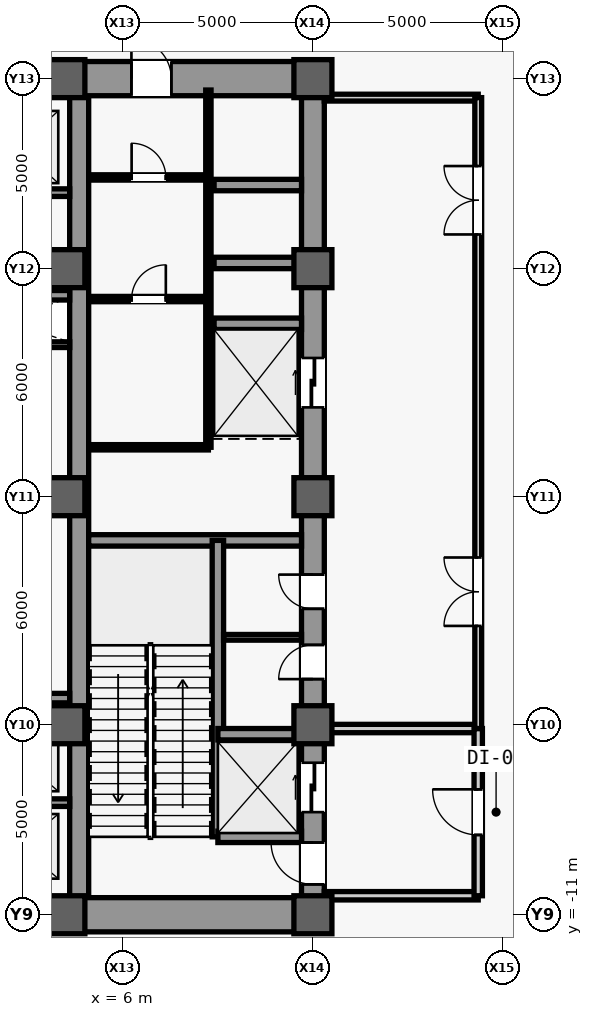
"""IFC4 building model, lengths in metres.
Left out: names, types, materials, properties, quantities, classifications, styles, units other than length and angle.
Written with IfcOpenShell. Run it as: python <this file> out.ifc"""

import sys

from ifc_helpers import new_model, si_unit, direction, frame, frame_2d, origin, origin_2d, place, context, subcontext, project, spatial, rectangle, extrude, source, transform, mapped, element, fill, save


model = new_model("IFC4")
c1 = context("Model", 3, precision=1e-05, world=origin(), true_north=direction((0.0, 1.0)))
c2 = subcontext(c1, "Body", "Model", "MODEL_VIEW")
j1 = project(units=[si_unit("LENGTHUNIT", "METRE"), si_unit("PLANEANGLEUNIT", "RADIAN")], contexts=[c1])
p1 = place(None, origin())
s1 = spatial("IfcSite", under=j1, at=p1, CompositionType="ELEMENT")
p2 = place(p1, origin())
s2 = spatial("IfcBuilding", under=s1, at=p2, CompositionType="ELEMENT")
p3 = place(p2, origin())
s3 = spatial("IfcBuildingStorey", under=s2, at=p3, CompositionType="ELEMENT", Elevation=0.0)
m1 = source(origin(), c2, "Body", "SweptSolid", [
    extrude(rectangle(XDim=22.0, YDim=0.6, at=frame_2d((11.0, 0.0))), origin(), (0.0, 0.0, 1.0), 6.28),
])
p4 = place(p3, frame((11.0, -11.0, 0.0), z_axis=(0.0, 0.0, 1.0), x_axis=(0.0, 1.0, 0.0)))
e1 = element("IfcWall", 1, at=p4, inside=s3, PredefinedType="SHEAR", context=c2, shape_type="MappedRepresentation", body=[
    mapped(m1, transform((0.0, 0.0, 0.0), scale=1.0)),
])
m2 = source(origin(), c2, "Body", "SweptSolid", [
    extrude(rectangle(XDim=1.1, YDim=2.2, at=frame_2d((0.55, 1.1))), frame((0.0, 0.31, 0.0), z_axis=(0.0, -1.0, 0.0), x_axis=(1.0, 0.0, 0.0)), (0.0, 0.0, 1.0), 0.62),
])
p5 = place(p4, frame((0.8, 0.0, 0.0)))
e2 = element("IfcOpeningElement", 2, at=p5, cuts=e1, PredefinedType="OPENING", context=c2, shape_type="MappedRepresentation", body=[
    mapped(m2, transform((0.0, 0.0, 0.0), scale=1.0)),
])
m3 = source(origin(), c2, "Body", "SweptSolid", [
    extrude(rectangle(XDim=0.9, YDim=2.15, at=frame_2d((0.45, 1.075))), frame((0.0, 0.31, 0.0), z_axis=(0.0, -1.0, 0.0), x_axis=(1.0, 0.0, 0.0)), (0.0, 0.0, 1.0), 0.62),
])
p6 = place(p4, frame((6.2, 0.0, 0.0)))
e3 = element("IfcOpeningElement", 3, at=p6, cuts=e1, PredefinedType="OPENING", context=c2, shape_type="MappedRepresentation", body=[
    mapped(m3, transform((0.0, 0.0, 0.0), scale=1.0)),
])
p7 = place(p4, frame((8.05, 0.0, 0.0)))
e4 = element("IfcOpeningElement", 4, at=p7, cuts=e1, PredefinedType="OPENING", context=c2, shape_type="MappedRepresentation", body=[
    mapped(m3, transform((0.0, 0.0, 0.0), scale=1.0)),
])
m4 = source(origin(), c2, "Body", "SweptSolid", [
    extrude(rectangle(XDim=1.3, YDim=2.3, at=frame_2d((0.65, 1.15))), frame((0.0, 0.31, 0.0), z_axis=(0.0, -1.0, 0.0), x_axis=(1.0, 0.0, 0.0)), (0.0, 0.0, 1.0), 0.62),
])
p8 = place(p4, frame((2.7, 0.0, 0.0)))
e5 = element("IfcOpeningElement", 5, at=p8, cuts=e1, PredefinedType="OPENING", context=c2, shape_type="MappedRepresentation", body=[
    mapped(m4, transform((0.0, 0.0, 0.0), scale=1.0)),
])
p9 = place(p4, frame((13.35, 0.0, 0.0)))
e6 = element("IfcOpeningElement", 6, at=p9, cuts=e1, PredefinedType="OPENING", context=c2, shape_type="MappedRepresentation", body=[
    mapped(m4, transform((0.0, 0.0, 0.0), scale=1.0)),
])
m5 = source(origin(), c2, "Body", "SweptSolid", [
    extrude(rectangle(XDim=21.4, YDim=0.5, at=frame_2d((10.7, 0.0))), origin(), (0.0, 0.0, 1.0), 6.28),
])
p10 = place(p3, frame((4.85, -10.7, 0.0), z_axis=(0.0, 0.0, 1.0), x_axis=(0.0, 1.0, 0.0)))
e7 = element("IfcWall", 7, at=p10, inside=s3, PredefinedType="SHEAR", context=c2, shape_type="MappedRepresentation", body=[
    mapped(m5, transform((0.0, 0.0, 0.0), scale=1.0)),
])
m6 = source(origin(), c2, "Body", "SweptSolid", [
    extrude(rectangle(XDim=5.85, YDim=0.9, at=frame_2d((2.925, 0.0))), origin(), (0.0, 0.0, 1.0), 6.28),
])
p11 = place(p3, frame((4.85, -11.0, 0.0), z_axis=(0.0, 0.0, 1.0), x_axis=(1.0, 0.0, 0.0)))
e8 = element("IfcWall", 8, at=p11, inside=s3, PredefinedType="SHEAR", context=c2, shape_type="MappedRepresentation", body=[
    mapped(m6, transform((0.0, 0.0, 0.0), scale=1.0)),
])
p12 = place(p3, frame((4.85, 11.0, 0.0), z_axis=(0.0, 0.0, 1.0), x_axis=(1.0, 0.0, 0.0)))
e9 = element("IfcWall", 9, at=p12, inside=s3, PredefinedType="SHEAR", context=c2, shape_type="MappedRepresentation", body=[
    mapped(m6, transform((0.0, 0.0, 0.0), scale=1.0)),
])
m7 = source(origin(), c2, "Body", "SweptSolid", [
    extrude(rectangle(XDim=1.05, YDim=2.2, at=frame_2d((0.525, 1.1))), frame((0.0, 0.46, 0.0), z_axis=(0.0, -1.0, 0.0), x_axis=(1.0, 0.0, 0.0)), (0.0, 0.0, 1.0), 0.92),
])
p13 = place(p12, frame((1.375, 0.0, 0.0)))
e10 = element("IfcOpeningElement", 10, at=p13, cuts=e9, PredefinedType="OPENING", context=c2, shape_type="MappedRepresentation", body=[
    mapped(m7, transform((0.0, 0.0, 0.0), scale=1.0)),
])
m8 = source(origin(), c2, "Body", "SweptSolid", [
    extrude(rectangle(XDim=5.6, YDim=0.3, at=frame_2d((2.8, 0.0))), origin(), (0.0, 0.0, 1.0), 6.28),
])
p14 = place(p3, frame((5.1, -1.15, 0.0), z_axis=(0.0, 0.0, 1.0), x_axis=(1.0, 0.0, 0.0)))
e11 = element("IfcWall", 11, at=p14, inside=s3, PredefinedType="SHEAR", context=c2, shape_type="MappedRepresentation", body=[
    mapped(m8, transform((0.0, 0.0, 0.0), scale=1.0)),
])
m9 = source(origin(), c2, "Body", "SweptSolid", [
    extrude(rectangle(XDim=9.2, YDim=0.5, at=frame_2d((4.6, 0.0))), origin(), (0.0, 0.0, 1.0), 6.28),
])
p15 = place(p3, frame((-4.6, -11.0, 0.0), z_axis=(0.0, 0.0, 1.0), x_axis=(1.0, 0.0, 0.0)))
e12 = element("IfcWall", 12, at=p15, inside=s3, PredefinedType="SHEAR", context=c2, shape_type="MappedRepresentation", body=[
    mapped(m9, transform((0.0, 0.0, 0.0), scale=1.0)),
])
m10 = source(origin(), c2, "Body", "SweptSolid", [
    extrude(rectangle(XDim=1.8, YDim=2.25, at=frame_2d((0.9, 1.125))), frame((0.0, 0.26, 0.0), z_axis=(0.0, -1.0, 0.0), x_axis=(1.0, 0.0, 0.0)), (0.0, 0.0, 1.0), 0.52),
])
p16 = place(p15, frame((3.7, 0.0, 0.0)))
e13 = element("IfcOpeningElement", 13, at=p16, cuts=e12, PredefinedType="OPENING", context=c2, shape_type="MappedRepresentation", body=[
    mapped(m10, transform((0.0, 0.0, 0.0), scale=1.0)),
])
p17 = place(p3, frame((-4.6, 11.0, 0.0), z_axis=(0.0, 0.0, 1.0), x_axis=(1.0, 0.0, 0.0)))
e14 = element("IfcWall", 14, at=p17, inside=s3, PredefinedType="SHEAR", context=c2, shape_type="MappedRepresentation", body=[
    mapped(m9, transform((0.0, 0.0, 0.0), scale=1.0)),
])
p18 = place(p17, frame((3.7, 0.0, 0.0)))
e15 = element("IfcOpeningElement", 15, at=p18, cuts=e14, PredefinedType="OPENING", context=c2, shape_type="MappedRepresentation", body=[
    mapped(m10, transform((0.0, 0.0, 0.0), scale=1.0)),
])
m11 = source(origin(), c2, "Body", "SweptSolid", [
    extrude(rectangle(XDim=1.0, YDim=1.0, at=origin_2d()), origin(), (0.0, 0.0, 1.0), 6.6),
])
for number, where, z_axis, x_axis in (
    (16, (4.5, -11.0, 0.0), (0.0, 0.0, 1.0), (1.0, 0.0, 0.0)),
    (17, (4.5, -6.0, 0.0), (0.0, 0.0, 1.0), (1.0, 0.0, 0.0)),
    (18, (4.5, 0.0, 0.0), (0.0, 0.0, 1.0), (1.0, 0.0, 0.0)),
    (19, (4.5, 6.0, 0.0), (0.0, 0.0, 1.0), (1.0, 0.0, 0.0)),
    (20, (4.5, 11.0, 0.0), (0.0, 0.0, 1.0), (1.0, 0.0, 0.0)),
    (21, (11.0, -11.0, 0.0), (0.0, 0.0, 1.0), (1.0, 0.0, 0.0)),
    (22, (11.0, -6.0, 0.0), (0.0, 0.0, 1.0), (1.0, 0.0, 0.0)),
    (23, (11.0, 0.0, 0.0), (0.0, 0.0, 1.0), (1.0, 0.0, 0.0)),
    (24, (11.0, 6.0, 0.0), (0.0, 0.0, 1.0), (1.0, 0.0, 0.0)),
    (25, (11.0, 11.0, 0.0), (0.0, 0.0, 1.0), (1.0, 0.0, 0.0)),
):
    element("IfcColumn", number, at=place(p3, frame(where, z_axis=z_axis, x_axis=x_axis)), inside=s3, PredefinedType="COLUMN", context=c2, shape_type="MappedRepresentation", body=[
        mapped(m11, transform((0.0, 0.0, 0.0), scale=1.0)),
    ])
m12 = source(origin(), c2, "Body", "SweptSolid", [
    extrude(rectangle(XDim=7.8, YDim=0.3, at=frame_2d((3.9, 0.0))), origin(), (0.0, 0.0, 1.0), 6.28),
])
p19 = place(p3, frame((8.5, -8.95, 0.0), z_axis=(0.0, 0.0, 1.0), x_axis=(0.0, 1.0, 0.0)))
e26 = element("IfcWall", 26, at=p19, inside=s3, PredefinedType="SHEAR", context=c2, shape_type="MappedRepresentation", body=[
    mapped(m12, transform((0.0, 0.0, 0.0), scale=1.0)),
])
m13 = source(origin(), c2, "Body", "SweptSolid", [
    extrude(rectangle(XDim=2.2, YDim=0.3, at=frame_2d((1.1, 0.0))), origin(), (0.0, 0.0, 1.0), 6.28),
])
for number, where, z_axis, x_axis in (
    (27, (8.5, -8.95, 0.0), (0.0, 0.0, 1.0), (1.0, 0.0, 0.0)),
    (28, (8.5, -6.25, 0.0), (0.0, 0.0, 1.0), (1.0, 0.0, 0.0)),
):
    element("IfcWall", number, at=place(p3, frame(where, z_axis=z_axis, x_axis=x_axis)), inside=s3, PredefinedType="SHEAR", context=c2, shape_type="MappedRepresentation", body=[
        mapped(m13, transform((0.0, 0.0, 0.0), scale=1.0)),
    ])
m14 = source(origin(), c2, "Body", "SweptSolid", [
    extrude(rectangle(XDim=2.3, YDim=0.3, at=frame_2d((1.15, 0.0))), origin(), (0.0, 0.0, 1.0), 6.28),
])
for number, where, z_axis, x_axis in (
    (29, (8.4, 4.55, 0.0), (0.0, 0.0, 1.0), (1.0, 0.0, 0.0)),
    (30, (8.4, 6.15, 0.0), (0.0, 0.0, 1.0), (1.0, 0.0, 0.0)),
    (31, (8.4, 8.2, 0.0), (0.0, 0.0, 1.0), (1.0, 0.0, 0.0)),
):
    element("IfcWall", number, at=place(p3, frame(where, z_axis=z_axis, x_axis=x_axis)), inside=s3, PredefinedType="SHEAR", context=c2, shape_type="MappedRepresentation", body=[
        mapped(m14, transform((0.0, 0.0, 0.0), scale=1.0)),
    ])
m15 = source(origin(), c2, "Body", "SweptSolid", [
    extrude(rectangle(XDim=2.05, YDim=0.15, at=frame_2d((1.025, 0.0))), origin(), (0.0, 0.0, 1.0), 6.28),
])
p20 = place(p3, frame((8.65, -3.7, 0.0), z_axis=(0.0, 0.0, 1.0), x_axis=(1.0, 0.0, 0.0)))
e32 = element("IfcWall", 32, at=p20, inside=s3, PredefinedType="PARTITIONING", context=c2, shape_type="MappedRepresentation", body=[
    mapped(m15, transform((0.0, 0.0, 0.0), scale=1.0)),
])
m16 = source(origin(), c2, "Body", "SweptSolid", [
    extrude(rectangle(XDim=9.4, YDim=0.14, at=frame_2d((4.7, 0.0))), origin(), (0.0, 0.0, 1.0), 6.28),
])
p21 = place(p3, frame((8.25, 1.3, 0.0), z_axis=(0.0, 0.0, 1.0), x_axis=(0.0, 1.0, 0.0)))
e33 = element("IfcWall", 33, at=p21, inside=s3, PredefinedType="PARTITIONING", context=c2, shape_type="MappedRepresentation", body=[
    mapped(m16, transform((0.0, 0.0, 0.0), scale=1.0)),
])
m17 = source(origin(), c2, "Body", "SweptSolid", [
    extrude(rectangle(XDim=3.15, YDim=0.14, at=frame_2d((1.575, 0.0))), origin(), (0.0, 0.0, 1.0), 6.28),
])
p22 = place(p3, frame((5.1, 1.3, 0.0), z_axis=(0.0, 0.0, 1.0), x_axis=(1.0, 0.0, 0.0)))
e34 = element("IfcWall", 34, at=p22, inside=s3, PredefinedType="PARTITIONING", context=c2, shape_type="MappedRepresentation", body=[
    mapped(m17, transform((0.0, 0.0, 0.0), scale=1.0)),
])
p23 = place(p3, frame((5.1, 8.4, 0.0), z_axis=(0.0, 0.0, 1.0), x_axis=(1.0, 0.0, 0.0)))
e35 = element("IfcWall", 35, at=p23, inside=s3, PredefinedType="PARTITIONING", context=c2, shape_type="MappedRepresentation", body=[
    mapped(m17, transform((0.0, 0.0, 0.0), scale=1.0)),
])
m18 = source(origin(), c2, "Body", "SweptSolid", [
    extrude(rectangle(XDim=0.9, YDim=2.15, at=frame_2d((0.45, 1.075))), frame((0.0, 0.08, 0.0), z_axis=(0.0, -1.0, 0.0), x_axis=(1.0, 0.0, 0.0)), (0.0, 0.0, 1.0), 0.16),
])
p24 = place(p23, frame((1.13, 0.0, 0.0)))
e36 = element("IfcOpeningElement", 36, at=p24, cuts=e35, PredefinedType="OPENING", context=c2, shape_type="MappedRepresentation", body=[
    mapped(m18, transform((0.0, 0.0, 0.0), scale=1.0)),
])
p25 = place(p3, frame((5.1, 5.2, 0.0), z_axis=(0.0, 0.0, 1.0), x_axis=(1.0, 0.0, 0.0)))
e37 = element("IfcWall", 37, at=p25, inside=s3, PredefinedType="PARTITIONING", context=c2, shape_type="MappedRepresentation", body=[
    mapped(m17, transform((0.0, 0.0, 0.0), scale=1.0)),
])
p26 = place(p25, frame((1.13, 0.0, 0.0)))
e38 = element("IfcOpeningElement", 38, at=p26, cuts=e37, PredefinedType="OPENING", context=c2, shape_type="MappedRepresentation", body=[
    mapped(m18, transform((0.0, 0.0, 0.0), scale=1.0)),
])
m19 = source(origin(), c2, "Body", "SweptSolid", [
    extrude(rectangle(XDim=4.05, YDim=0.22, at=frame_2d((2.025, 0.0))), origin(), (0.0, 0.0, 1.0), 6.28),
])
for number, where, z_axis, x_axis in (
    (39, (11.3, -10.5, 0.0), (0.0, 0.0, 1.0), (1.0, 0.0, 0.0)),
    (40, (11.3, -6.1, 0.0), (0.0, 0.0, 1.0), (1.0, 0.0, 0.0)),
):
    element("IfcWall", number, at=place(p3, frame(where, z_axis=z_axis, x_axis=x_axis)), inside=s3, PredefinedType="PARTITIONING", context=c2, shape_type="MappedRepresentation", body=[
        mapped(m19, transform((0.0, 0.0, 0.0), scale=1.0)),
    ])
m20 = source(origin(), c2, "Body", "SweptSolid", [
    extrude(rectangle(XDim=4.4, YDim=0.22, at=frame_2d((2.2, 0.0))), origin(), (0.0, 0.0, 1.0), 6.28),
])
p27 = place(p3, frame((15.35, -10.5, 0.0), z_axis=(0.0, 0.0, 1.0), x_axis=(0.0, 1.0, 0.0)))
e41 = element("IfcWall", 41, at=p27, inside=s3, PredefinedType="PARTITIONING", context=c2, shape_type="MappedRepresentation", body=[
    mapped(m20, transform((0.0, 0.0, 0.0), scale=1.0)),
])
m21 = source(origin(), c2, "Body", "SweptSolid", [
    extrude(rectangle(XDim=1.2, YDim=2.2, at=frame_2d((0.6, 1.1))), frame((0.0, 0.12, 0.0), z_axis=(0.0, -1.0, 0.0), x_axis=(1.0, 0.0, 0.0)), (0.0, 0.0, 1.0), 0.24),
])
p28 = place(p27, frame((1.6, 0.0, 0.0)))
e42 = element("IfcOpeningElement", 42, at=p28, cuts=e41, PredefinedType="OPENING", context=c2, shape_type="MappedRepresentation", body=[
    mapped(m21, transform((0.0, 0.0, 0.0), scale=1.0)),
])
m22 = source(origin(), c2, "Body", "SweptSolid", [
    extrude(rectangle(XDim=4.05, YDim=0.18, at=frame_2d((2.025, 0.0))), origin(), (0.0, 0.0, 1.0), 6.28),
])
p29 = place(p3, frame((11.3, 10.5, 0.0), z_axis=(0.0, 0.0, 1.0), x_axis=(1.0, 0.0, 0.0)))
e43 = element("IfcWall", 43, at=p29, inside=s3, PredefinedType="PARTITIONING", context=c2, shape_type="MappedRepresentation", body=[
    mapped(m22, transform((0.0, 0.0, 0.0), scale=1.0)),
])
m23 = source(origin(), c2, "Body", "SweptSolid", [
    extrude(rectangle(XDim=16.6, YDim=0.18, at=frame_2d((8.3, 0.0))), origin(), (0.0, 0.0, 1.0), 6.28),
])
p30 = place(p3, frame((15.35, -6.1, 0.0), z_axis=(0.0, 0.0, 1.0), x_axis=(0.0, 1.0, 0.0)))
e44 = element("IfcWall", 44, at=p30, inside=s3, PredefinedType="PARTITIONING", context=c2, shape_type="MappedRepresentation", body=[
    mapped(m23, transform((0.0, 0.0, 0.0), scale=1.0)),
])
m24 = source(origin(), c2, "Body", "SweptSolid", [
    extrude(rectangle(XDim=1.8, YDim=2.25, at=frame_2d((0.9, 1.125))), frame((0.0, 0.1, 0.0), z_axis=(0.0, -1.0, 0.0), x_axis=(1.0, 0.0, 0.0)), (0.0, 0.0, 1.0), 0.2),
])
p31 = place(p30, frame((2.7, 0.0, 0.0)))
e45 = element("IfcOpeningElement", 45, at=p31, cuts=e44, PredefinedType="OPENING", context=c2, shape_type="MappedRepresentation", body=[
    mapped(m24, transform((0.0, 0.0, 0.0), scale=1.0)),
])
p32 = place(p30, frame((13.0, 0.0, 0.0)))
e46 = element("IfcOpeningElement", 46, at=p32, cuts=e44, PredefinedType="OPENING", context=c2, shape_type="MappedRepresentation", body=[
    mapped(m24, transform((0.0, 0.0, 0.0), scale=1.0)),
])
m25 = source(origin(), c2, "Body", "SweptSolid", [
    extrude(rectangle(XDim=3.45, YDim=0.15, at=frame_2d((1.725, 0.0))), origin(), (0.0, 0.0, 1.0), 6.28),
])
p33 = place(p3, frame((1.15, 4.0, 0.0), z_axis=(0.0, 0.0, 1.0), x_axis=(1.0, 0.0, 0.0)))
e47 = element("IfcWall", 47, at=p33, inside=s3, PredefinedType="PARTITIONING", context=c2, shape_type="MappedRepresentation", body=[
    mapped(m25, transform((0.0, 0.0, 0.0), scale=1.0)),
])
m26 = source(origin(), c2, "Body", "SweptSolid", [
    extrude(rectangle(XDim=2.45, YDim=0.2, at=frame_2d((1.225, 0.0))), origin(), (0.0, 0.0, 1.0), 6.28),
])
p34 = place(p3, frame((2.15, -8.05, 0.0), z_axis=(0.0, 0.0, 1.0), x_axis=(1.0, 0.0, 0.0)))
e48 = element("IfcWall", 48, at=p34, inside=s3, PredefinedType="SHEAR", context=c2, shape_type="MappedRepresentation", body=[
    mapped(m26, transform((0.0, 0.0, 0.0), scale=1.0)),
])
m27 = source(origin(), c2, "Body", "SweptSolid", [
    extrude(rectangle(XDim=9.2, YDim=0.25, at=frame_2d((4.6, 0.0))), origin(), (0.0, 0.0, 1.0), 6.28),
])
p35 = place(p3, frame((-4.6, -5.3, 0.0), z_axis=(0.0, 0.0, 1.0), x_axis=(1.0, 0.0, 0.0)))
e49 = element("IfcWall", 49, at=p35, inside=s3, PredefinedType="SHEAR", context=c2, shape_type="MappedRepresentation", body=[
    mapped(m27, transform((0.0, 0.0, 0.0), scale=1.0)),
])
m28 = source(origin(), c2, "Body", "SweptSolid", [
    extrude(rectangle(XDim=1.05, YDim=2.2, at=frame_2d((0.525, 1.1))), frame((0.0, 0.135, 0.0), z_axis=(0.0, -1.0, 0.0), x_axis=(1.0, 0.0, 0.0)), (0.0, 0.0, 1.0), 0.27),
])
p36 = place(p35, frame((4.075, 0.0, 0.0)))
e50 = element("IfcOpeningElement", 50, at=p36, cuts=e49, PredefinedType="OPENING", context=c2, shape_type="MappedRepresentation", body=[
    mapped(m28, transform((0.0, 0.0, 0.0), scale=1.0)),
])
p37 = place(p3, frame((2.15, 8.0, 0.0), z_axis=(0.0, 0.0, 1.0), x_axis=(1.0, 0.0, 0.0)))
e51 = element("IfcWall", 51, at=p37, inside=s3, PredefinedType="SHEAR", context=c2, shape_type="MappedRepresentation", body=[
    mapped(m26, transform((0.0, 0.0, 0.0), scale=1.0)),
])
p38 = place(p3, frame((-4.6, 5.3, 0.0), z_axis=(0.0, 0.0, 1.0), x_axis=(1.0, 0.0, 0.0)))
e52 = element("IfcWall", 52, at=p38, inside=s3, PredefinedType="SHEAR", context=c2, shape_type="MappedRepresentation", body=[
    mapped(m27, transform((0.0, 0.0, 0.0), scale=1.0)),
])
p39 = place(p38, frame((4.075, 0.0, 0.0)))
e53 = element("IfcOpeningElement", 53, at=p39, cuts=e52, PredefinedType="OPENING", context=c2, shape_type="MappedRepresentation", body=[
    mapped(m28, transform((0.0, 0.0, 0.0), scale=1.0)),
])
m29 = source(origin(), c2, "Body", "SweptSolid", [
    extrude(rectangle(XDim=1.1, YDim=2.2, at=frame_2d((0.55, 1.1))), frame((0.0, 0.025, 0.0), z_axis=(0.0, -1.0, 0.0), x_axis=(1.0, 0.0, 0.0)), (0.0, 0.0, 1.0), 0.05),
])
p40 = place(p5, origin())
e54 = element("IfcDoor", 54, at=p40, inside=s3, OperationType="SINGLE_SWING_RIGHT", PredefinedType="DOOR", context=c2, shape_type="MappedRepresentation", body=[
    mapped(m29, transform((0.0, 0.0, 0.0), scale=1.0)),
])
fill(e2, e54)
m30 = source(origin(), c2, "Body", "SweptSolid", [
    extrude(rectangle(XDim=0.9, YDim=2.15, at=frame_2d((0.45, 1.075))), frame((0.0, 0.025, 0.0), z_axis=(0.0, -1.0, 0.0), x_axis=(1.0, 0.0, 0.0)), (0.0, 0.0, 1.0), 0.05),
])
p41 = place(p6, origin())
e55 = element("IfcDoor", 55, at=p41, inside=s3, OperationType="SINGLE_SWING_LEFT", PredefinedType="DOOR", context=c2, shape_type="MappedRepresentation", body=[
    mapped(m30, transform((0.0, 0.0, 0.0), scale=1.0)),
])
fill(e3, e55)
p42 = place(p7, origin())
e56 = element("IfcDoor", 56, at=p42, inside=s3, OperationType="SINGLE_SWING_RIGHT", PredefinedType="DOOR", context=c2, shape_type="MappedRepresentation", body=[
    mapped(m30, transform((0.0, 0.0, 0.0), scale=1.0)),
])
fill(e4, e56)
m31 = source(origin(), c2, "Body", "SweptSolid", [
    extrude(rectangle(XDim=1.05, YDim=2.2, at=frame_2d((0.525, 1.1))), frame((0.0, 0.025, 0.0), z_axis=(0.0, -1.0, 0.0), x_axis=(1.0, 0.0, 0.0)), (0.0, 0.0, 1.0), 0.05),
])
p43 = place(p13, origin())
e57 = element("IfcDoor", 57, at=p43, inside=s3, OperationType="SINGLE_SWING_LEFT", PredefinedType="DOOR", context=c2, shape_type="MappedRepresentation", body=[
    mapped(m31, transform((0.0, 0.0, 0.0), scale=1.0)),
])
fill(e10, e57)
p44 = place(p24, origin())
e58 = element("IfcDoor", 58, at=p44, inside=s3, OperationType="SINGLE_SWING_LEFT", PredefinedType="DOOR", context=c2, shape_type="MappedRepresentation", body=[
    mapped(m30, transform((0.0, 0.0, 0.0), scale=1.0)),
])
fill(e36, e58)
p45 = place(p26, origin())
e59 = element("IfcDoor", 59, at=p45, inside=s3, OperationType="SINGLE_SWING_RIGHT", PredefinedType="DOOR", context=c2, shape_type="MappedRepresentation", body=[
    mapped(m30, transform((0.0, 0.0, 0.0), scale=1.0)),
])
fill(e38, e59)
m32 = source(origin(), c2, "Body", "SweptSolid", [
    extrude(rectangle(XDim=1.2, YDim=2.2, at=frame_2d((0.6, 1.1))), frame((0.0, 0.025, 0.0), z_axis=(0.0, -1.0, 0.0), x_axis=(1.0, 0.0, 0.0)), (0.0, 0.0, 1.0), 0.05),
])
p46 = place(p28, origin())
e60 = element("IfcDoor", 60, at=p46, inside=s3, OperationType="SINGLE_SWING_RIGHT", PredefinedType="DOOR", context=c2, shape_type="MappedRepresentation", body=[
    mapped(m32, transform((0.0, 0.0, 0.0), scale=1.0)),
])
fill(e42, e60)
m33 = source(origin(), c2, "Body", "SweptSolid", [
    extrude(rectangle(XDim=1.8, YDim=2.25, at=frame_2d((0.9, 1.125))), frame((0.0, 0.025, 0.0), z_axis=(0.0, -1.0, 0.0), x_axis=(1.0, 0.0, 0.0)), (0.0, 0.0, 1.0), 0.05),
])
p47 = place(p31, origin())
e61 = element("IfcDoor", 61, at=p47, inside=s3, OperationType="SINGLE_SWING_RIGHT", PredefinedType="DOOR", context=c2, shape_type="MappedRepresentation", body=[
    mapped(m33, transform((0.0, 0.0, 0.0), scale=1.0)),
])
fill(e45, e61)
p48 = place(p32, origin())
e62 = element("IfcDoor", 62, at=p48, inside=s3, OperationType="SINGLE_SWING_LEFT", PredefinedType="DOOR", context=c2, shape_type="MappedRepresentation", body=[
    mapped(m33, transform((0.0, 0.0, 0.0), scale=1.0)),
])
fill(e46, e62)
m34 = source(origin(), c2, "Body", "SweptSolid", [
    extrude(rectangle(XDim=1.3, YDim=2.3, at=frame_2d((0.65, 1.15))), frame((0.0, 0.025, 0.0), z_axis=(0.0, -1.0, 0.0), x_axis=(1.0, 0.0, 0.0)), (0.0, 0.0, 1.0), 0.05),
])
p49 = place(p8, origin())
e63 = element("IfcDoor", 63, at=p49, inside=s3, OperationType="SLIDING_TO_LEFT", PredefinedType="DOOR", context=c2, shape_type="MappedRepresentation", body=[
    mapped(m34, transform((0.0, 0.0, 0.0), scale=1.0)),
])
fill(e5, e63)
p50 = place(p9, origin())
e64 = element("IfcDoor", 64, at=p50, inside=s3, OperationType="SLIDING_TO_LEFT", PredefinedType="DOOR", context=c2, shape_type="MappedRepresentation", body=[
    mapped(m34, transform((0.0, 0.0, 0.0), scale=1.0)),
])
fill(e6, e64)
save(model, sys.argv[1])
